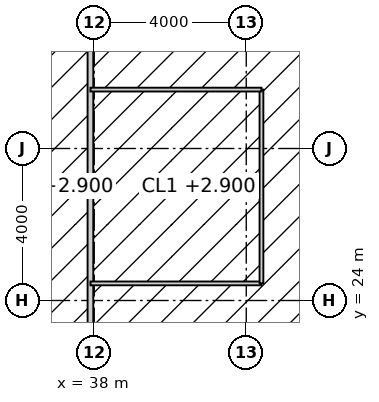
"""IFC4 building model, lengths in metres.
Left out: names, types, materials, properties, quantities, classifications, styles, units other than length and angle.
Written with IfcOpenShell. Run it as: python <this file> out.ifc"""

import sys

from ifc_helpers import new_model, si_unit, direction, frame, frame_2d, origin, place, context, subcontext, project, spatial, rectangle, extrude, element, fill, save


model = new_model("IFC4")
c1 = context("Model", 3, precision=1e-05, world=origin(), true_north=direction((0.0, 1.0)))
c2 = subcontext(c1, "Body", "Model", "MODEL_VIEW")
j1 = project(units=[si_unit("LENGTHUNIT", "METRE"), si_unit("PLANEANGLEUNIT", "RADIAN")], contexts=[c1])
p1 = place(None, origin())
s1 = spatial("IfcSite", under=j1, at=p1, CompositionType="ELEMENT")
p2 = place(p1, origin())
s2 = spatial("IfcBuilding", under=s1, at=p2, CompositionType="ELEMENT")
p3 = place(p2, frame((0.0, 0.0, 179.8)))
s3 = spatial("IfcBuildingStorey", under=s2, at=p3, CompositionType="ELEMENT", Elevation=179.8)
p4 = place(p3, frame((37.9, 15.625, 0.0), z_axis=(0.0, 0.0, 1.0), x_axis=(0.0, 1.0, 0.0)))
e1 = element("IfcWall", 1, at=p4, inside=s3, PredefinedType="PARTITIONING", context=c2, shape_type="SweptSolid", body=[
    extrude(rectangle(XDim=22.75, YDim=0.15, at=frame_2d((11.375, 0.0))), origin(), (0.0, 0.0, 1.0), 2.95),
])
p5 = place(p4, frame((10.475, 0.0, 0.0)))
e2 = element("IfcOpeningElement", 2, at=p5, cuts=e1, PredefinedType="OPENING", context=c2, shape_type="SweptSolid", body=[
    extrude(rectangle(XDim=1.8, YDim=2.4, at=frame_2d((0.9, 1.2))), frame((0.0, 0.085, 0.0), z_axis=(0.0, -1.0, 0.0), x_axis=(1.0, 0.0, 0.0)), (0.0, 0.0, 1.0), 0.17),
])
p6 = place(p3, frame((37.9, 24.45, 0.0), z_axis=(0.0, 0.0, 1.0), x_axis=(1.0, 0.0, 0.0)))
e3 = element("IfcWall", 3, at=p6, inside=s3, PredefinedType="PARTITIONING", context=c2, shape_type="SweptSolid", body=[
    extrude(rectangle(XDim=4.5, YDim=0.1, at=frame_2d((2.25, 0.0))), origin(), (0.0, 0.0, 1.0), 3.85),
])
p7 = place(p3, frame((42.4, 24.45, 0.0), z_axis=(0.0, 0.0, 1.0), x_axis=(0.0, 1.0, 0.0)))
e4 = element("IfcWall", 4, at=p7, inside=s3, PredefinedType="PARTITIONING", context=c2, shape_type="SweptSolid", body=[
    extrude(rectangle(XDim=5.1, YDim=0.1, at=frame_2d((2.55, 0.0))), origin(), (0.0, 0.0, 1.0), 3.85),
])
p8 = place(p7, frame((2.05, 0.0, 0.0)))
e5 = element("IfcOpeningElement", 5, at=p8, cuts=e4, PredefinedType="OPENING", context=c2, shape_type="SweptSolid", body=[
    extrude(rectangle(XDim=1.0, YDim=2.2, at=frame_2d((0.5, 1.1))), frame((0.0, 0.06, 0.0), z_axis=(0.0, -1.0, 0.0), x_axis=(1.0, 0.0, 0.0)), (0.0, 0.0, 1.0), 0.12),
])
p9 = place(p3, frame((42.4, 29.55, 0.0), z_axis=(0.0, 0.0, 1.0), x_axis=(-1.0, 0.0, 0.0)))
e6 = element("IfcWall", 6, at=p9, inside=s3, PredefinedType="PARTITIONING", context=c2, shape_type="SweptSolid", body=[
    extrude(rectangle(XDim=4.5, YDim=0.1, at=frame_2d((2.25, 0.0))), origin(), (0.0, 0.0, 1.0), 3.85),
])
p10 = place(p5, origin())
e7 = element("IfcDoor", 7, at=p10, inside=s3, OperationType="DOUBLE_DOOR_DOUBLE_SWING", PredefinedType="DOOR", context=c2, shape_type="SweptSolid", body=[
    extrude(rectangle(XDim=1.8, YDim=2.4, at=frame_2d((0.9, 1.2))), frame((0.0, 0.025, 0.0), z_axis=(0.0, -1.0, 0.0), x_axis=(1.0, 0.0, 0.0)), (0.0, 0.0, 1.0), 0.05),
])
fill(e2, e7)
p11 = place(p8, origin())
e8 = element("IfcDoor", 8, at=p11, inside=s3, OperationType="SINGLE_SWING_RIGHT", PredefinedType="DOOR", context=c2, shape_type="SweptSolid", body=[
    extrude(rectangle(XDim=1.0, YDim=2.2, at=frame_2d((0.5, 1.1))), frame((0.0, 0.025, 0.0), z_axis=(0.0, -1.0, 0.0), x_axis=(1.0, 0.0, 0.0)), (0.0, 0.0, 1.0), 0.05),
])
fill(e5, e8)
save(model, sys.argv[1])
